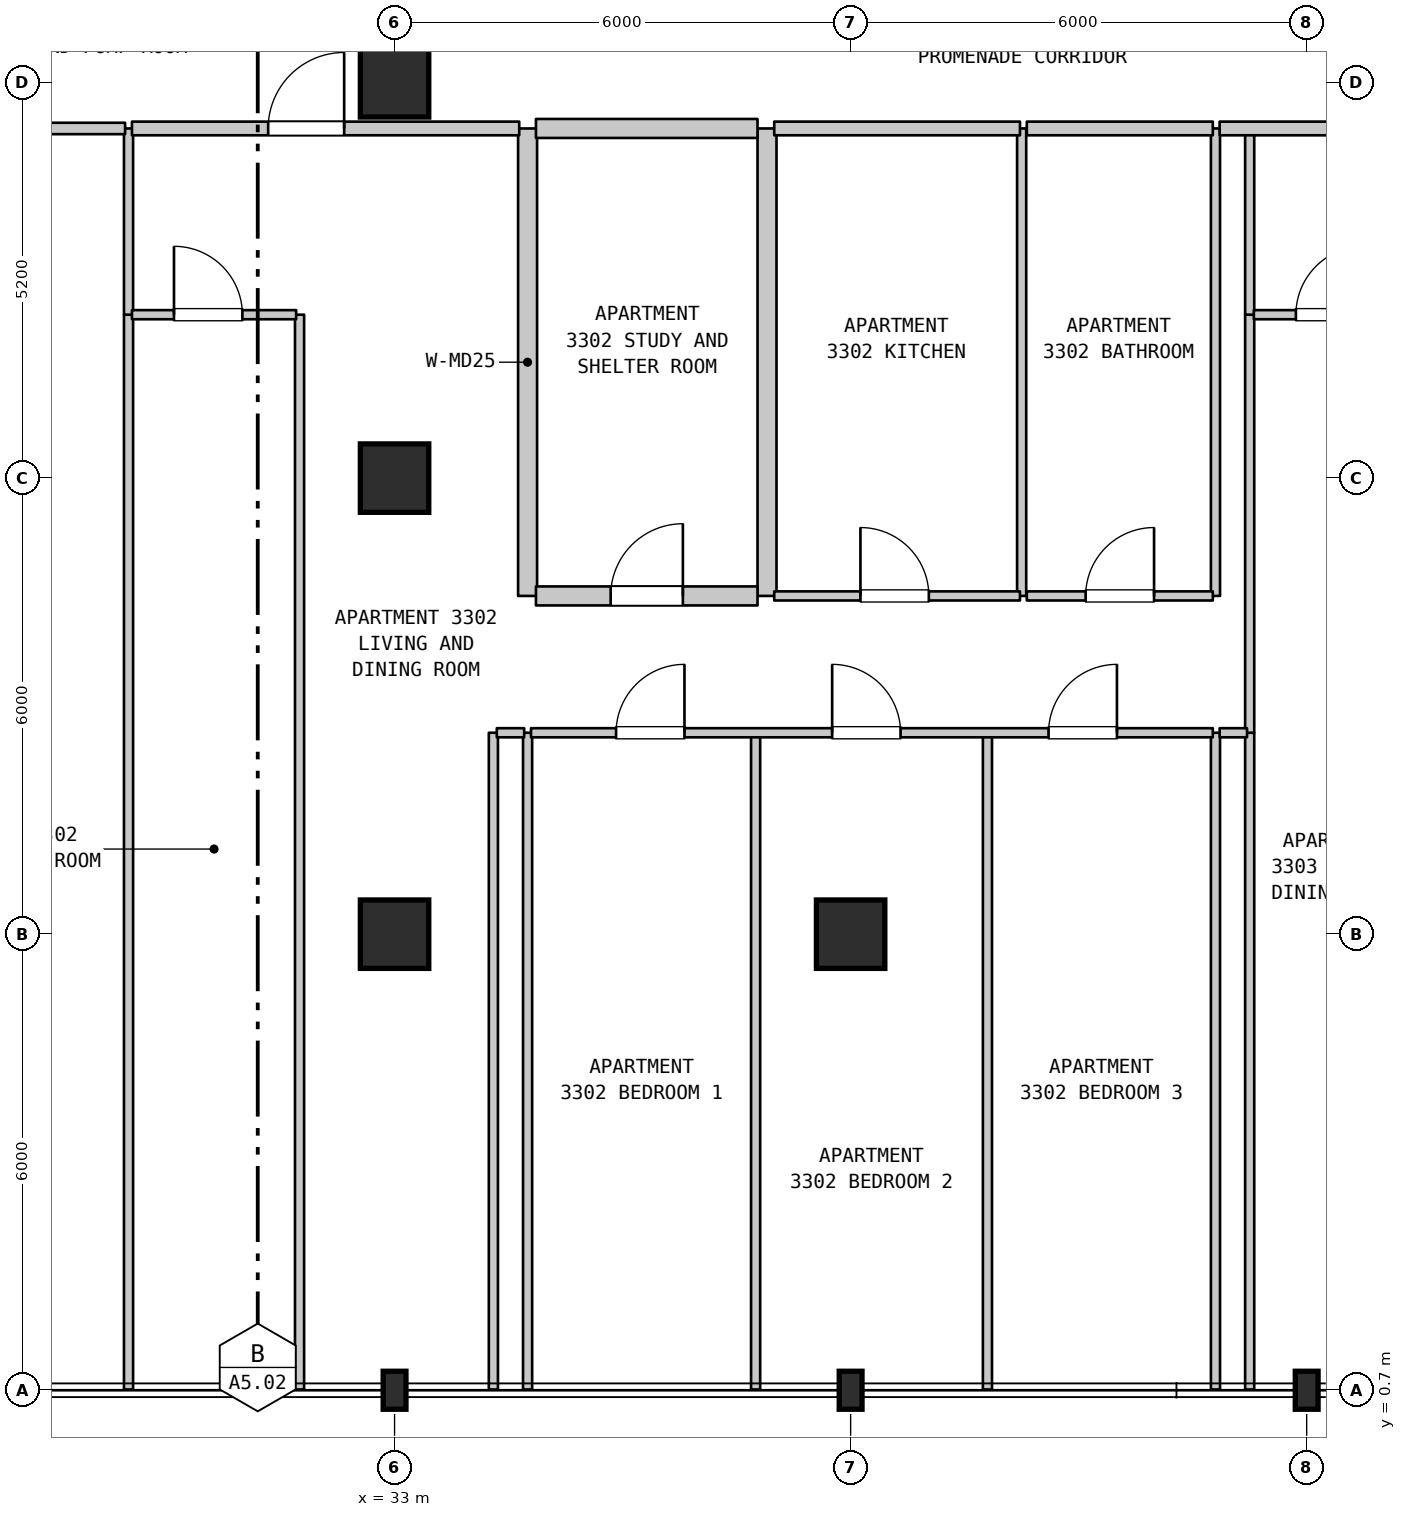
"""IFC4 building model, lengths in metres.
Left out: names, types, materials, properties, quantities, classifications, styles, units other than length and angle.
Written with IfcOpenShell. Run it as: python <this file> out.ifc"""

import sys

from ifc_helpers import new_model, si_unit, direction, frame, frame_2d, origin, origin_2d, place, context, subcontext, project, spatial, rectangle, i_section, extrude, element, fill, save


model = new_model("IFC4")
c1 = context("Model", 3, precision=1e-05, world=origin(), true_north=direction((0.0, 1.0)))
c2 = subcontext(c1, "Body", "Model", "MODEL_VIEW")
j1 = project(units=[si_unit("LENGTHUNIT", "METRE"), si_unit("PLANEANGLEUNIT", "RADIAN")], contexts=[c1])
p1 = place(None, origin())
s1 = spatial("IfcSite", under=j1, at=p1, CompositionType="ELEMENT")
p2 = place(p1, origin())
s2 = spatial("IfcBuilding", under=s1, at=p2, CompositionType="ELEMENT")
p3 = place(p2, frame((0.0, 0.0, 137.2)))
s3 = spatial("IfcBuildingStorey", under=s2, at=p3, CompositionType="ELEMENT", Elevation=137.2)
p4 = place(p3, frame((33.0, 0.7, 0.0), z_axis=(0.0, 0.0, 1.0), x_axis=(1.0, 0.0, 0.0)))
e1 = element("IfcColumn", 1, at=p4, inside=s3, PredefinedType="COLUMN", context=c2, shape_type="SweptSolid", body=[
    extrude(i_section(OverallWidth=0.3, OverallDepth=0.5, WebThickness=0.014, FlangeThickness=0.028, FilletRadius=0.027, at=origin_2d()), origin(), (0.0, 0.0, 1.0), 3.7),
])
for number, where, z_axis, x_axis in (
    (2, (33.0, 6.7, 0.0), (0.0, 0.0, 1.0), (1.0, 0.0, 0.0)),
    (3, (33.0, 12.7, 0.0), (0.0, 0.0, 1.0), (1.0, 0.0, 0.0)),
    (4, (33.0, 17.9, 0.0), (0.0, 0.0, 1.0), (1.0, 0.0, 0.0)),
):
    element("IfcColumn", number, at=place(p3, frame(where, z_axis=z_axis, x_axis=x_axis)), inside=s3, PredefinedType="COLUMN", context=c2, shape_type="SweptSolid", body=[
        extrude(rectangle(XDim=0.9, YDim=0.9, at=origin_2d()), origin(), (0.0, 0.0, 1.0), 3.7),
    ])
p5 = place(p3, frame((39.0, 0.7, 0.0), z_axis=(0.0, 0.0, 1.0), x_axis=(1.0, 0.0, 0.0)))
e5 = element("IfcColumn", 5, at=p5, inside=s3, PredefinedType="COLUMN", context=c2, shape_type="SweptSolid", body=[
    extrude(i_section(OverallWidth=0.3, OverallDepth=0.5, WebThickness=0.014, FlangeThickness=0.028, FilletRadius=0.027, at=origin_2d()), origin(), (0.0, 0.0, 1.0), 3.7),
])
p6 = place(p3, frame((39.0, 6.7, 0.0), z_axis=(0.0, 0.0, 1.0), x_axis=(1.0, 0.0, 0.0)))
e6 = element("IfcColumn", 6, at=p6, inside=s3, PredefinedType="COLUMN", context=c2, shape_type="SweptSolid", body=[
    extrude(rectangle(XDim=0.9, YDim=0.9, at=origin_2d()), origin(), (0.0, 0.0, 1.0), 3.7),
])
p7 = place(p3, frame((45.0, 0.7, 0.0), z_axis=(0.0, 0.0, 1.0), x_axis=(1.0, 0.0, 0.0)))
e7 = element("IfcColumn", 7, at=p7, inside=s3, PredefinedType="COLUMN", context=c2, shape_type="SweptSolid", body=[
    extrude(i_section(OverallWidth=0.3, OverallDepth=0.5, WebThickness=0.014, FlangeThickness=0.028, FilletRadius=0.027, at=origin_2d()), origin(), (0.0, 0.0, 1.0), 3.7),
])
p8 = place(p3, frame((29.5, 0.71, 0.0), z_axis=(0.0, 0.0, 1.0), x_axis=(0.0, 1.0, 0.0)))
e8 = element("IfcWall", 8, at=p8, inside=s3, PredefinedType="PARTITIONING", context=c2, shape_type="SweptSolid", body=[
    extrude(rectangle(XDim=14.14, YDim=0.12, at=frame_2d((7.07, 0.0))), origin(), (0.0, 0.0, 1.0), 3.385),
])
p9 = place(p3, frame((29.5, 14.85, 0.0), z_axis=(0.0, 0.0, 1.0), x_axis=(0.0, 1.0, 0.0)))
e9 = element("IfcWall", 9, at=p9, inside=s3, PredefinedType="PARTITIONING", context=c2, shape_type="SweptSolid", body=[
    extrude(rectangle(XDim=2.45, YDim=0.12, at=frame_2d((1.225, 0.0))), origin(), (0.0, 0.0, 1.0), 3.385),
])
p10 = place(p3, frame((31.75, 0.71, 0.0), z_axis=(0.0, 0.0, 1.0), x_axis=(0.0, 1.0, 0.0)))
e10 = element("IfcWall", 10, at=p10, inside=s3, PredefinedType="PARTITIONING", context=c2, shape_type="SweptSolid", body=[
    extrude(rectangle(XDim=14.14, YDim=0.12, at=frame_2d((7.07, 0.0))), origin(), (0.0, 0.0, 1.0), 3.385),
])
for number, where, z_axis, x_axis in (
    (11, (34.3, 0.71, 0.0), (0.0, 0.0, 1.0), (0.0, 1.0, 0.0)),
    (12, (34.75, 0.71, 0.0), (0.0, 0.0, 1.0), (0.0, 1.0, 0.0)),
):
    element("IfcWall", number, at=place(p3, frame(where, z_axis=z_axis, x_axis=x_axis)), inside=s3, PredefinedType="PARTITIONING", context=c2, shape_type="SweptSolid", body=[
        extrude(rectangle(XDim=8.64, YDim=0.12, at=frame_2d((4.32, 0.0))), origin(), (0.0, 0.0, 1.0), 3.385),
    ])
p11 = place(p3, frame((34.75, 11.15, 0.0), z_axis=(0.0, 0.0, 1.0), x_axis=(0.0, 1.0, 0.0)))
e13 = element("IfcWall", 13, at=p11, inside=s3, PredefinedType="STANDARD", context=c2, shape_type="SweptSolid", body=[
    extrude(rectangle(XDim=6.15, YDim=0.25, at=frame_2d((3.075, 0.0))), origin(), (0.0, 0.0, 1.0), 3.385),
])
p12 = place(p3, frame((37.75, 0.71, 0.0), z_axis=(0.0, 0.0, 1.0), x_axis=(0.0, 1.0, 0.0)))
e14 = element("IfcWall", 14, at=p12, inside=s3, PredefinedType="PARTITIONING", context=c2, shape_type="SweptSolid", body=[
    extrude(rectangle(XDim=8.64, YDim=0.12, at=frame_2d((4.32, 0.0))), origin(), (0.0, 0.0, 1.0), 3.385),
])
p13 = place(p3, frame((37.9, 11.15, 0.0), z_axis=(0.0, 0.0, 1.0), x_axis=(0.0, 1.0, 0.0)))
e15 = element("IfcWall", 15, at=p13, inside=s3, PredefinedType="STANDARD", context=c2, shape_type="SweptSolid", body=[
    extrude(rectangle(XDim=6.15, YDim=0.25, at=frame_2d((3.075, 0.0))), origin(), (0.0, 0.0, 1.0), 3.385),
])
p14 = place(p3, frame((40.8, 0.71, 0.0), z_axis=(0.0, 0.0, 1.0), x_axis=(0.0, 1.0, 0.0)))
e16 = element("IfcWall", 16, at=p14, inside=s3, PredefinedType="PARTITIONING", context=c2, shape_type="SweptSolid", body=[
    extrude(rectangle(XDim=8.64, YDim=0.12, at=frame_2d((4.32, 0.0))), origin(), (0.0, 0.0, 1.0), 3.385),
])
p15 = place(p3, frame((41.25, 11.15, 0.0), z_axis=(0.0, 0.0, 1.0), x_axis=(0.0, 1.0, 0.0)))
e17 = element("IfcWall", 17, at=p15, inside=s3, PredefinedType="PARTITIONING", context=c2, shape_type="SweptSolid", body=[
    extrude(rectangle(XDim=6.15, YDim=0.12, at=frame_2d((3.075, 0.0))), origin(), (0.0, 0.0, 1.0), 3.385),
])
p16 = place(p3, frame((43.8, 0.71, 0.0), z_axis=(0.0, 0.0, 1.0), x_axis=(0.0, 1.0, 0.0)))
e18 = element("IfcWall", 18, at=p16, inside=s3, PredefinedType="PARTITIONING", context=c2, shape_type="SweptSolid", body=[
    extrude(rectangle(XDim=8.64, YDim=0.12, at=frame_2d((4.32, 0.0))), origin(), (0.0, 0.0, 1.0), 3.385),
])
p17 = place(p3, frame((43.8, 11.15, 0.0), z_axis=(0.0, 0.0, 1.0), x_axis=(0.0, 1.0, 0.0)))
e19 = element("IfcWall", 19, at=p17, inside=s3, PredefinedType="PARTITIONING", context=c2, shape_type="SweptSolid", body=[
    extrude(rectangle(XDim=6.15, YDim=0.12, at=frame_2d((3.075, 0.0))), origin(), (0.0, 0.0, 1.0), 3.385),
])
p18 = place(p3, frame((44.25, 0.71, 0.0), z_axis=(0.0, 0.0, 1.0), x_axis=(0.0, 1.0, 0.0)))
e20 = element("IfcWall", 20, at=p18, inside=s3, PredefinedType="PARTITIONING", context=c2, shape_type="SweptSolid", body=[
    extrude(rectangle(XDim=8.64, YDim=0.12, at=frame_2d((4.32, 0.0))), origin(), (0.0, 0.0, 1.0), 3.385),
])
p19 = place(p3, frame((44.25, 9.35, 0.0), z_axis=(0.0, 0.0, 1.0), x_axis=(0.0, 1.0, 0.0)))
e21 = element("IfcWall", 21, at=p19, inside=s3, PredefinedType="PARTITIONING", context=c2, shape_type="SweptSolid", body=[
    extrude(rectangle(XDim=5.5, YDim=0.12, at=frame_2d((2.75, 0.0))), origin(), (0.0, 0.0, 1.0), 3.385),
])
p20 = place(p3, frame((44.25, 14.85, 0.0), z_axis=(0.0, 0.0, 1.0), x_axis=(0.0, 1.0, 0.0)))
e22 = element("IfcWall", 22, at=p20, inside=s3, PredefinedType="PARTITIONING", context=c2, shape_type="SweptSolid", body=[
    extrude(rectangle(XDim=2.45, YDim=0.12, at=frame_2d((1.225, 0.0))), origin(), (0.0, 0.0, 1.0), 3.385),
])
p21 = place(p3, frame((34.345, 9.35, 0.0), z_axis=(0.0, 0.0, 1.0), x_axis=(1.0, 0.0, 0.0)))
e23 = element("IfcWall", 23, at=p21, inside=s3, PredefinedType="PARTITIONING", context=c2, shape_type="SweptSolid", body=[
    extrude(rectangle(XDim=0.36, YDim=0.12, at=frame_2d((0.18, 0.0))), origin(), (0.0, 0.0, 1.0), 3.385),
])
p22 = place(p3, frame((34.795, 9.35, 0.0), z_axis=(0.0, 0.0, 1.0), x_axis=(1.0, 0.0, 0.0)))
e24 = element("IfcWall", 24, at=p22, inside=s3, PredefinedType="PARTITIONING", context=c2, shape_type="SweptSolid", body=[
    extrude(rectangle(XDim=8.97, YDim=0.12, at=frame_2d((4.485, 0.0))), origin(), (0.0, 0.0, 1.0), 3.385),
])
p23 = place(p22, frame((1.119, 0.0, 0.0)))
e25 = element("IfcOpeningElement", 25, at=p23, cuts=e24, PredefinedType="OPENING", context=c2, shape_type="SweptSolid", body=[
    extrude(rectangle(XDim=0.9, YDim=2.15, at=frame_2d((0.45, 1.075))), frame((0.0, 0.07, 0.0), z_axis=(0.0, -1.0, 0.0), x_axis=(1.0, 0.0, 0.0)), (0.0, 0.0, 1.0), 0.14),
])
p24 = place(p22, frame((3.962, 0.0, 0.0)))
e26 = element("IfcOpeningElement", 26, at=p24, cuts=e24, PredefinedType="OPENING", context=c2, shape_type="SweptSolid", body=[
    extrude(rectangle(XDim=0.9, YDim=2.15, at=frame_2d((0.45, 1.075))), frame((0.0, 0.07, 0.0), z_axis=(0.0, -1.0, 0.0), x_axis=(1.0, 0.0, 0.0)), (0.0, 0.0, 1.0), 0.14),
])
p25 = place(p22, frame((6.809, 0.0, 0.0)))
e27 = element("IfcOpeningElement", 27, at=p25, cuts=e24, PredefinedType="OPENING", context=c2, shape_type="SweptSolid", body=[
    extrude(rectangle(XDim=0.9, YDim=2.15, at=frame_2d((0.45, 1.075))), frame((0.0, 0.07, 0.0), z_axis=(0.0, -1.0, 0.0), x_axis=(1.0, 0.0, 0.0)), (0.0, 0.0, 1.0), 0.14),
])
p26 = place(p3, frame((43.855, 9.35, 0.0), z_axis=(0.0, 0.0, 1.0), x_axis=(1.0, 0.0, 0.0)))
e28 = element("IfcWall", 28, at=p26, inside=s3, PredefinedType="PARTITIONING", context=c2, shape_type="SweptSolid", body=[
    extrude(rectangle(XDim=0.36, YDim=0.12, at=frame_2d((0.18, 0.0))), origin(), (0.0, 0.0, 1.0), 3.385),
])
p27 = place(p3, frame((34.86, 11.15, 0.0), z_axis=(0.0, 0.0, 1.0), x_axis=(1.0, 0.0, 0.0)))
e29 = element("IfcWall", 29, at=p27, inside=s3, PredefinedType="STANDARD", context=c2, shape_type="SweptSolid", body=[
    extrude(rectangle(XDim=2.915, YDim=0.25, at=frame_2d((1.458, 0.0))), origin(), (0.0, 0.0, 1.0), 3.385),
])
p28 = place(p27, frame((0.983, 0.0, 0.0)))
e30 = element("IfcOpeningElement", 30, at=p28, cuts=e29, PredefinedType="OPENING", context=c2, shape_type="SweptSolid", body=[
    extrude(rectangle(XDim=0.95, YDim=2.15, at=frame_2d((0.475, 1.075))), frame((0.0, 0.135, 0.0), z_axis=(0.0, -1.0, 0.0), x_axis=(1.0, 0.0, 0.0)), (0.0, 0.0, 1.0), 0.27),
])
p29 = place(p3, frame((37.995, 11.15, 0.0), z_axis=(0.0, 0.0, 1.0), x_axis=(1.0, 0.0, 0.0)))
e31 = element("IfcWall", 31, at=p29, inside=s3, PredefinedType="PARTITIONING", context=c2, shape_type="SweptSolid", body=[
    extrude(rectangle(XDim=3.233, YDim=0.12, at=frame_2d((1.616, 0.0))), origin(), (0.0, 0.0, 1.0), 3.385),
])
p30 = place(p29, frame((1.134, 0.0, 0.0)))
e32 = element("IfcOpeningElement", 32, at=p30, cuts=e31, PredefinedType="OPENING", context=c2, shape_type="SweptSolid", body=[
    extrude(rectangle(XDim=0.9, YDim=2.15, at=frame_2d((0.45, 1.075))), frame((0.0, 0.07, 0.0), z_axis=(0.0, -1.0, 0.0), x_axis=(1.0, 0.0, 0.0)), (0.0, 0.0, 1.0), 0.14),
])
p31 = place(p3, frame((41.318, 11.15, 0.0), z_axis=(0.0, 0.0, 1.0), x_axis=(1.0, 0.0, 0.0)))
e33 = element("IfcWall", 33, at=p31, inside=s3, PredefinedType="PARTITIONING", context=c2, shape_type="SweptSolid", body=[
    extrude(rectangle(XDim=2.447, YDim=0.12, at=frame_2d((1.223, 0.0))), origin(), (0.0, 0.0, 1.0), 3.385),
])
p32 = place(p31, frame((0.774, 0.0, 0.0)))
e34 = element("IfcOpeningElement", 34, at=p32, cuts=e33, PredefinedType="OPENING", context=c2, shape_type="SweptSolid", body=[
    extrude(rectangle(XDim=0.9, YDim=2.1, at=frame_2d((0.45, 1.05))), frame((0.0, 0.07, 0.0), z_axis=(0.0, -1.0, 0.0), x_axis=(1.0, 0.0, 0.0)), (0.0, 0.0, 1.0), 0.14),
])
p33 = place(p3, frame((29.545, 14.85, 0.0), z_axis=(0.0, 0.0, 1.0), x_axis=(1.0, 0.0, 0.0)))
e35 = element("IfcWall", 35, at=p33, inside=s3, PredefinedType="PARTITIONING", context=c2, shape_type="SweptSolid", body=[
    extrude(rectangle(XDim=2.16, YDim=0.12, at=frame_2d((1.08, 0.0))), origin(), (0.0, 0.0, 1.0), 3.385),
])
p34 = place(p33, frame((0.553, 0.0, 0.0)))
e36 = element("IfcOpeningElement", 36, at=p34, cuts=e35, PredefinedType="OPENING", context=c2, shape_type="SweptSolid", body=[
    extrude(rectangle(XDim=0.9, YDim=2.15, at=frame_2d((0.45, 1.075))), frame((0.0, 0.07, 0.0), z_axis=(0.0, -1.0, 0.0), x_axis=(1.0, 0.0, 0.0)), (0.0, 0.0, 1.0), 0.14),
])
p35 = place(p3, frame((44.305, 14.85, 0.0), z_axis=(0.0, 0.0, 1.0), x_axis=(1.0, 0.0, 0.0)))
e37 = element("IfcWall", 37, at=p35, inside=s3, PredefinedType="PARTITIONING", context=c2, shape_type="SweptSolid", body=[
    extrude(rectangle(XDim=2.16, YDim=0.12, at=frame_2d((1.08, 0.0))), origin(), (0.0, 0.0, 1.0), 3.385),
])
p36 = place(p35, frame((0.553, 0.0, 0.0)))
e38 = element("IfcOpeningElement", 38, at=p36, cuts=e37, PredefinedType="OPENING", context=c2, shape_type="SweptSolid", body=[
    extrude(rectangle(XDim=0.9, YDim=2.15, at=frame_2d((0.45, 1.075))), frame((0.0, 0.07, 0.0), z_axis=(0.0, -1.0, 0.0), x_axis=(1.0, 0.0, 0.0)), (0.0, 0.0, 1.0), 0.14),
])
p37 = place(p3, frame((24.845, 17.3, 0.0), z_axis=(0.0, 0.0, 1.0), x_axis=(1.0, 0.0, 0.0)))
e39 = element("IfcWall", 39, at=p37, inside=s3, PredefinedType="STANDARD", context=c2, shape_type="SweptSolid", body=[
    extrude(rectangle(XDim=4.61, YDim=0.15, at=frame_2d((2.305, 0.0))), origin(), (0.0, 0.0, 1.0), 3.385),
])
p38 = place(p37, frame((1.734, 0.0, 0.0)))
e40 = element("IfcOpeningElement", 40, at=p38, cuts=e39, PredefinedType="OPENING", context=c2, shape_type="SweptSolid", body=[
    extrude(rectangle(XDim=1.0, YDim=2.15, at=frame_2d((0.5, 1.075))), frame((0.0, 0.085, 0.0), z_axis=(0.0, -1.0, 0.0), x_axis=(1.0, 0.0, 0.0)), (0.0, 0.0, 1.0), 0.17),
])
p39 = place(p3, frame((29.545, 17.3, 0.0), z_axis=(0.0, 0.0, 1.0), x_axis=(1.0, 0.0, 0.0)))
e41 = element("IfcWall", 41, at=p39, inside=s3, PredefinedType="STANDARD", context=c2, shape_type="SweptSolid", body=[
    extrude(rectangle(XDim=5.095, YDim=0.18, at=frame_2d((2.547, 0.0))), origin(), (0.0, 0.0, 1.0), 3.385),
])
p40 = place(p39, frame((1.792, 0.0, 0.0)))
e42 = element("IfcOpeningElement", 42, at=p40, cuts=e41, PredefinedType="OPENING", context=c2, shape_type="SweptSolid", body=[
    extrude(rectangle(XDim=1.0, YDim=2.15, at=frame_2d((0.5, 1.075))), frame((0.0, 0.1, 0.0), z_axis=(0.0, -1.0, 0.0), x_axis=(1.0, 0.0, 0.0)), (0.0, 0.0, 1.0), 0.2),
])
p41 = place(p3, frame((34.86, 17.3, 0.0), z_axis=(0.0, 0.0, 1.0), x_axis=(1.0, 0.0, 0.0)))
e43 = element("IfcWall", 43, at=p41, inside=s3, PredefinedType="STANDARD", context=c2, shape_type="SweptSolid", body=[
    extrude(rectangle(XDim=2.915, YDim=0.25, at=frame_2d((1.458, 0.0))), origin(), (0.0, 0.0, 1.0), 3.385),
])
p42 = place(p3, frame((37.995, 17.3, 0.0), z_axis=(0.0, 0.0, 1.0), x_axis=(1.0, 0.0, 0.0)))
e44 = element("IfcWall", 44, at=p42, inside=s3, PredefinedType="STANDARD", context=c2, shape_type="SweptSolid", body=[
    extrude(rectangle(XDim=3.233, YDim=0.18, at=frame_2d((1.616, 0.0))), origin(), (0.0, 0.0, 1.0), 3.385),
])
p43 = place(p3, frame((41.318, 17.3, 0.0), z_axis=(0.0, 0.0, 1.0), x_axis=(1.0, 0.0, 0.0)))
e45 = element("IfcWall", 45, at=p43, inside=s3, PredefinedType="STANDARD", context=c2, shape_type="SweptSolid", body=[
    extrude(rectangle(XDim=2.447, YDim=0.18, at=frame_2d((1.223, 0.0))), origin(), (0.0, 0.0, 1.0), 3.385),
])
p44 = place(p3, frame((43.855, 17.3, 0.0), z_axis=(0.0, 0.0, 1.0), x_axis=(1.0, 0.0, 0.0)))
e46 = element("IfcWall", 46, at=p44, inside=s3, PredefinedType="STANDARD", context=c2, shape_type="SweptSolid", body=[
    extrude(rectangle(XDim=5.21, YDim=0.18, at=frame_2d((2.605, 0.0))), origin(), (0.0, 0.0, 1.0), 3.385),
])
p45 = place(p44, frame((2.305, 0.0, 0.0)))
e47 = element("IfcOpeningElement", 47, at=p45, cuts=e46, PredefinedType="OPENING", context=c2, shape_type="SweptSolid", body=[
    extrude(rectangle(XDim=1.0, YDim=2.15, at=frame_2d((0.5, 1.075))), frame((0.0, 0.1, 0.0), z_axis=(0.0, -1.0, 0.0), x_axis=(1.0, 0.0, 0.0)), (0.0, 0.0, 1.0), 0.2),
])
p46 = place(p23, origin())
e48 = element("IfcDoor", 48, at=p46, inside=s3, OperationType="SINGLE_SWING_RIGHT", PredefinedType="DOOR", context=c2, shape_type="SweptSolid", body=[
    extrude(rectangle(XDim=0.9, YDim=2.15, at=frame_2d((0.45, 1.075))), frame((0.0, 0.025, 0.0), z_axis=(0.0, -1.0, 0.0), x_axis=(1.0, 0.0, 0.0)), (0.0, 0.0, 1.0), 0.05),
])
fill(e25, e48)
p47 = place(p24, origin())
e49 = element("IfcDoor", 49, at=p47, inside=s3, OperationType="SINGLE_SWING_LEFT", PredefinedType="DOOR", context=c2, shape_type="SweptSolid", body=[
    extrude(rectangle(XDim=0.9, YDim=2.15, at=frame_2d((0.45, 1.075))), frame((0.0, 0.025, 0.0), z_axis=(0.0, -1.0, 0.0), x_axis=(1.0, 0.0, 0.0)), (0.0, 0.0, 1.0), 0.05),
])
fill(e26, e49)
p48 = place(p25, origin())
e50 = element("IfcDoor", 50, at=p48, inside=s3, OperationType="SINGLE_SWING_RIGHT", PredefinedType="DOOR", context=c2, shape_type="SweptSolid", body=[
    extrude(rectangle(XDim=0.9, YDim=2.15, at=frame_2d((0.45, 1.075))), frame((0.0, 0.025, 0.0), z_axis=(0.0, -1.0, 0.0), x_axis=(1.0, 0.0, 0.0)), (0.0, 0.0, 1.0), 0.05),
])
fill(e27, e50)
p49 = place(p28, origin())
e51 = element("IfcDoor", 51, at=p49, inside=s3, OperationType="SINGLE_SWING_RIGHT", PredefinedType="DOOR", context=c2, shape_type="SweptSolid", body=[
    extrude(rectangle(XDim=0.95, YDim=2.15, at=frame_2d((0.475, 1.075))), frame((0.0, 0.025, 0.0), z_axis=(0.0, -1.0, 0.0), x_axis=(1.0, 0.0, 0.0)), (0.0, 0.0, 1.0), 0.05),
])
fill(e30, e51)
p50 = place(p30, origin())
e52 = element("IfcDoor", 52, at=p50, inside=s3, OperationType="SINGLE_SWING_LEFT", PredefinedType="DOOR", context=c2, shape_type="SweptSolid", body=[
    extrude(rectangle(XDim=0.9, YDim=2.15, at=frame_2d((0.45, 1.075))), frame((0.0, 0.025, 0.0), z_axis=(0.0, -1.0, 0.0), x_axis=(1.0, 0.0, 0.0)), (0.0, 0.0, 1.0), 0.05),
])
fill(e32, e52)
p51 = place(p32, origin())
e53 = element("IfcDoor", 53, at=p51, inside=s3, OperationType="SINGLE_SWING_RIGHT", PredefinedType="DOOR", context=c2, shape_type="SweptSolid", body=[
    extrude(rectangle(XDim=0.9, YDim=2.1, at=frame_2d((0.45, 1.05))), frame((0.0, 0.025, 0.0), z_axis=(0.0, -1.0, 0.0), x_axis=(1.0, 0.0, 0.0)), (0.0, 0.0, 1.0), 0.05),
])
fill(e34, e53)
p52 = place(p34, origin())
e54 = element("IfcDoor", 54, at=p52, inside=s3, OperationType="SINGLE_SWING_LEFT", PredefinedType="DOOR", context=c2, shape_type="SweptSolid", body=[
    extrude(rectangle(XDim=0.9, YDim=2.15, at=frame_2d((0.45, 1.075))), frame((0.0, 0.025, 0.0), z_axis=(0.0, -1.0, 0.0), x_axis=(1.0, 0.0, 0.0)), (0.0, 0.0, 1.0), 0.05),
])
fill(e36, e54)
p53 = place(p36, origin())
e55 = element("IfcDoor", 55, at=p53, inside=s3, OperationType="SINGLE_SWING_RIGHT", PredefinedType="DOOR", context=c2, shape_type="SweptSolid", body=[
    extrude(rectangle(XDim=0.9, YDim=2.15, at=frame_2d((0.45, 1.075))), frame((0.0, 0.025, 0.0), z_axis=(0.0, -1.0, 0.0), x_axis=(1.0, 0.0, 0.0)), (0.0, 0.0, 1.0), 0.05),
])
fill(e38, e55)
p54 = place(p40, origin())
e56 = element("IfcDoor", 56, at=p54, inside=s3, OperationType="SINGLE_SWING_RIGHT", PredefinedType="DOOR", context=c2, shape_type="SweptSolid", body=[
    extrude(rectangle(XDim=1.0, YDim=2.15, at=frame_2d((0.5, 1.075))), frame((0.0, 0.025, 0.0), z_axis=(0.0, -1.0, 0.0), x_axis=(1.0, 0.0, 0.0)), (0.0, 0.0, 1.0), 0.05),
])
fill(e42, e56)
save(model, sys.argv[1])
